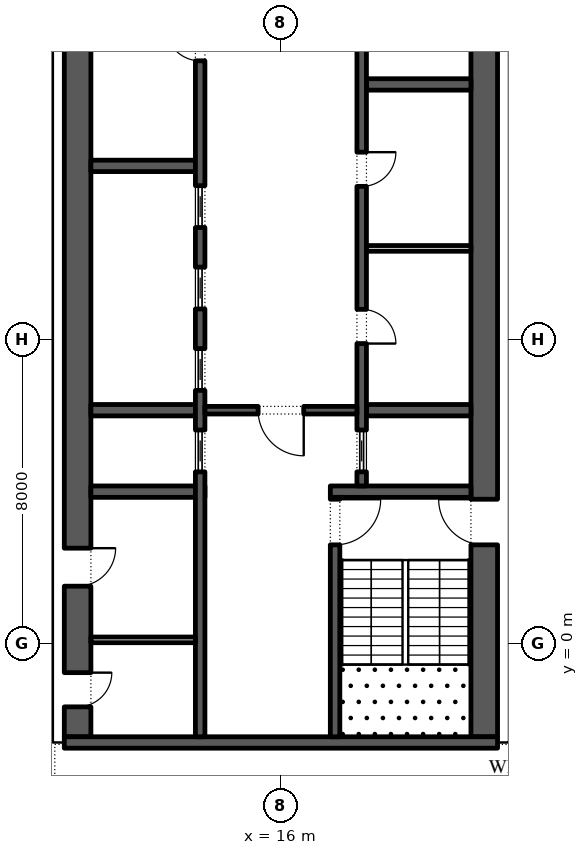
"""IFC4 building model, lengths in metres.
Left out: names, types, materials, properties, quantities, classifications, styles, units other than length and angle.
Written with IfcOpenShell. Run it as: python <this file> out.ifc"""

import sys

from ifc_helpers import new_model, si_unit, direction, frame, frame_2d, origin, place, context, subcontext, project, spatial, rectangle, extrude, element, fill, save


model = new_model("IFC4")
c1 = context("Model", 3, precision=1e-05, world=origin(), true_north=direction((0.0, 1.0)))
c2 = subcontext(c1, "Body", "Model", "MODEL_VIEW")
j1 = project(units=[si_unit("LENGTHUNIT", "METRE"), si_unit("PLANEANGLEUNIT", "RADIAN")], contexts=[c1])
p1 = place(None, origin())
s1 = spatial("IfcSite", under=j1, at=p1, CompositionType="ELEMENT")
p2 = place(p1, origin())
s2 = spatial("IfcBuilding", under=s1, at=p2, CompositionType="ELEMENT")
p3 = place(p2, frame((0.0, 0.0, 171.6)))
s3 = spatial("IfcBuildingStorey", under=s2, at=p3, CompositionType="ELEMENT", Elevation=171.6)
p4 = place(p3, frame((33.157, -5.092, 0.0), z_axis=(0.0, 0.0, 1.0), x_axis=(-0.224950279389, 0.974370243697, 0.0)))
e1 = element("IfcWall", 1, at=p4, inside=s3, PredefinedType="STANDARD", context=c2, shape_type="SweptSolid", body=[
    extrude(rectangle(XDim=49.5, YDim=0.3, at=frame_2d((24.75, 0.0))), origin(), (0.0, 0.0, 1.0), 4.0),
])
p5 = place(p4, frame((2.207, 0.0, 0.0)))
e2 = element("IfcOpeningElement", 2, at=p5, cuts=e1, PredefinedType="OPENING", context=c2, shape_type="SweptSolid", body=[
    extrude(rectangle(XDim=2.4, YDim=3.125, at=frame_2d((1.2, 1.562))), frame((0.0, 0.16, 0.0), z_axis=(0.0, -1.0, 0.0), x_axis=(1.0, 0.0, 0.0)), (0.0, 0.0, 1.0), 0.32),
])
p6 = place(p4, frame((8.121, 0.0, 0.45)))
e3 = element("IfcOpeningElement", 3, at=p6, cuts=e1, PredefinedType="OPENING", context=c2, shape_type="SweptSolid", body=[
    extrude(rectangle(XDim=4.5, YDim=2.875, at=frame_2d((2.25, 1.438))), frame((0.0, 0.16, 0.0), z_axis=(0.0, -1.0, 0.0), x_axis=(1.0, 0.0, 0.0)), (0.0, 0.0, 1.0), 0.32),
])
p7 = place(p4, frame((15.236, 0.0, 0.45)))
e4 = element("IfcOpeningElement", 4, at=p7, cuts=e1, PredefinedType="OPENING", context=c2, shape_type="SweptSolid", body=[
    extrude(rectangle(XDim=4.5, YDim=2.875, at=frame_2d((2.25, 1.438))), frame((0.0, 0.16, 0.0), z_axis=(0.0, -1.0, 0.0), x_axis=(1.0, 0.0, 0.0)), (0.0, 0.0, 1.0), 0.32),
])
p8 = place(p4, frame((22.35, 0.0, 0.45)))
e5 = element("IfcOpeningElement", 5, at=p8, cuts=e1, PredefinedType="OPENING", context=c2, shape_type="SweptSolid", body=[
    extrude(rectangle(XDim=4.5, YDim=3.0, at=frame_2d((2.25, 1.5))), frame((0.0, 0.16, 0.0), z_axis=(0.0, -1.0, 0.0), x_axis=(1.0, 0.0, 0.0)), (0.0, 0.0, 1.0), 0.32),
])
p9 = place(p4, frame((30.514, 0.0, 0.0)))
e6 = element("IfcOpeningElement", 6, at=p9, cuts=e1, PredefinedType="OPENING", context=c2, shape_type="SweptSolid", body=[
    extrude(rectangle(XDim=2.4, YDim=3.45, at=frame_2d((1.2, 1.725))), frame((0.0, 0.16, 0.0), z_axis=(0.0, -1.0, 0.0), x_axis=(1.0, 0.0, 0.0)), (0.0, 0.0, 1.0), 0.32),
])
p10 = place(p4, frame((36.579, 0.0, 0.45)))
e7 = element("IfcOpeningElement", 7, at=p10, cuts=e1, PredefinedType="OPENING", context=c2, shape_type="SweptSolid", body=[
    extrude(rectangle(XDim=4.5, YDim=3.05, at=frame_2d((2.25, 1.525))), frame((0.0, 0.16, 0.0), z_axis=(0.0, -1.0, 0.0), x_axis=(1.0, 0.0, 0.0)), (0.0, 0.0, 1.0), 0.32),
])
p11 = place(p4, frame((43.693, 0.0, 0.45)))
e8 = element("IfcOpeningElement", 8, at=p11, cuts=e1, PredefinedType="OPENING", context=c2, shape_type="SweptSolid", body=[
    extrude(rectangle(XDim=4.5, YDim=3.05, at=frame_2d((2.25, 1.525))), frame((0.0, 0.16, 0.0), z_axis=(0.0, -1.0, 0.0), x_axis=(1.0, 0.0, 0.0)), (0.0, 0.0, 1.0), 0.32),
])
p12 = place(p3, frame((21.35, -2.45, 0.0), z_axis=(0.0, 0.0, 1.0), x_axis=(0.0, 1.0, 0.0)))
e9 = element("IfcWall", 9, at=p12, inside=s3, PredefinedType="SHEAR", context=c2, shape_type="SweptSolid", body=[
    extrude(rectangle(XDim=27.9, YDim=0.7, at=frame_2d((13.95, 0.0))), origin(), (0.0, 0.0, 1.0), 4.0),
])
p13 = place(p12, frame((5.05, 0.0, 0.0)))
e10 = element("IfcOpeningElement", 10, at=p13, cuts=e9, PredefinedType="OPENING", context=c2, shape_type="SweptSolid", body=[
    extrude(rectangle(XDim=1.2, YDim=2.1, at=frame_2d((0.6, 1.05))), frame((0.0, 0.36, 0.0), z_axis=(0.0, -1.0, 0.0), x_axis=(1.0, 0.0, 0.0)), (0.0, 0.0, 1.0), 0.72),
])
p14 = place(p12, frame((21.65, 0.0, 0.0)))
e11 = element("IfcOpeningElement", 11, at=p14, cuts=e9, PredefinedType="OPENING", context=c2, shape_type="SweptSolid", body=[
    extrude(rectangle(XDim=1.2, YDim=2.1, at=frame_2d((0.6, 1.05))), frame((0.0, 0.36, 0.0), z_axis=(0.0, -1.0, 0.0), x_axis=(1.0, 0.0, 0.0)), (0.0, 0.0, 1.0), 0.72),
])
p15 = place(p3, frame((10.65, -2.45, 0.0), z_axis=(0.0, 0.0, 1.0), x_axis=(0.0, 1.0, 0.0)))
e12 = element("IfcWall", 12, at=p15, inside=s3, PredefinedType="SHEAR", context=c2, shape_type="SweptSolid", body=[
    extrude(rectangle(XDim=27.9, YDim=0.7, at=frame_2d((13.95, 0.0))), origin(), (0.0, 0.0, 1.0), 4.0),
])
p16 = place(p15, frame((23.65, 0.0, 0.0)))
e13 = element("IfcOpeningElement", 13, at=p16, cuts=e12, PredefinedType="OPENING", context=c2, shape_type="SweptSolid", body=[
    extrude(rectangle(XDim=2.4, YDim=2.1, at=frame_2d((1.2, 1.05))), frame((0.0, 0.36, 0.0), z_axis=(0.0, -1.0, 0.0), x_axis=(1.0, 0.0, 0.0)), (0.0, 0.0, 1.0), 0.72),
])
p17 = place(p15, frame((0.788, 0.0, 0.0)))
e14 = element("IfcOpeningElement", 14, at=p17, cuts=e12, PredefinedType="OPENING", context=c2, shape_type="SweptSolid", body=[
    extrude(rectangle(XDim=0.9, YDim=2.1, at=frame_2d((0.45, 1.05))), frame((0.0, 0.36, 0.0), z_axis=(0.0, -1.0, 0.0), x_axis=(1.0, 0.0, 0.0)), (0.0, 0.0, 1.0), 0.72),
])
p18 = place(p15, frame((3.962, 0.0, 0.0)))
e15 = element("IfcOpeningElement", 15, at=p18, cuts=e12, PredefinedType="OPENING", context=c2, shape_type="SweptSolid", body=[
    extrude(rectangle(XDim=1.0, YDim=2.1, at=frame_2d((0.5, 1.05))), frame((0.0, 0.36, 0.0), z_axis=(0.0, -1.0, 0.0), x_axis=(1.0, 0.0, 0.0)), (0.0, 0.0, 1.0), 0.72),
])
p19 = place(p3, frame((10.3, -2.6, 0.0), z_axis=(0.0, 0.0, 1.0), x_axis=(1.0, 0.0, 0.0)))
e16 = element("IfcWall", 16, at=p19, inside=s3, PredefinedType="SHEAR", context=c2, shape_type="SweptSolid", body=[
    extrude(rectangle(XDim=11.4, YDim=0.3, at=frame_2d((5.7, 0.0))), origin(), (0.0, 0.0, 1.0), 4.0),
])
p20 = place(p3, frame((17.3, 4.0, 0.0), z_axis=(0.0, 0.0, 1.0), x_axis=(1.0, 0.0, 0.0)))
e17 = element("IfcWall", 17, at=p20, inside=s3, PredefinedType="SHEAR", context=c2, shape_type="SweptSolid", body=[
    extrude(rectangle(XDim=3.7, YDim=0.3, at=frame_2d((1.85, 0.0))), origin(), (0.0, 0.0, 1.0), 4.0),
])
p21 = place(p3, frame((17.425, -2.45, 0.0), z_axis=(0.0, 0.0, 1.0), x_axis=(0.0, 1.0, 0.0)))
e18 = element("IfcWall", 18, at=p21, inside=s3, PredefinedType="SHEAR", context=c2, shape_type="SweptSolid", body=[
    extrude(rectangle(XDim=6.3, YDim=0.25, at=frame_2d((3.15, 0.0))), origin(), (0.0, 0.0, 1.0), 4.0),
])
p22 = place(p21, frame((5.05, 0.0, 0.0)))
e19 = element("IfcOpeningElement", 19, at=p22, cuts=e18, PredefinedType="OPENING", context=c2, shape_type="SweptSolid", body=[
    extrude(rectangle(XDim=1.2, YDim=2.1, at=frame_2d((0.6, 1.05))), frame((0.0, 0.135, 0.0), z_axis=(0.0, -1.0, 0.0), x_axis=(1.0, 0.0, 0.0)), (0.0, 0.0, 1.0), 0.27),
])
for number, where, z_axis, x_axis in (
    (20, (18.25, 6.143, 0.0), (0.0, 0.0, 1.0), (1.0, 0.0, 0.0)),
    (21, (18.25, 14.714, 0.0), (0.0, 0.0, 1.0), (1.0, 0.0, 0.0)),
):
    element("IfcWall", number, at=place(p3, frame(where, z_axis=z_axis, x_axis=x_axis)), inside=s3, PredefinedType="SHEAR", context=c2, shape_type="SweptSolid", body=[
        extrude(rectangle(XDim=2.75, YDim=0.3, at=frame_2d((1.375, 0.0))), origin(), (0.0, 0.0, 1.0), 4.0),
    ])
p23 = place(p3, frame((18.125, 4.15, 0.0), z_axis=(0.0, 0.0, 1.0), x_axis=(0.0, 1.0, 0.0)))
e22 = element("IfcWall", 22, at=p23, inside=s3, PredefinedType="SHEAR", context=c2, shape_type="SweptSolid", body=[
    extrude(rectangle(XDim=14.7, YDim=0.25, at=frame_2d((7.35, 0.0))), origin(), (0.0, 0.0, 1.0), 4.0),
])
p24 = place(p23, frame((3.746, 0.0, 0.0)))
e23 = element("IfcOpeningElement", 23, at=p24, cuts=e22, PredefinedType="OPENING", context=c2, shape_type="SweptSolid", body=[
    extrude(rectangle(XDim=0.9, YDim=2.1, at=frame_2d((0.45, 1.05))), frame((0.0, 0.135, 0.0), z_axis=(0.0, -1.0, 0.0), x_axis=(1.0, 0.0, 0.0)), (0.0, 0.0, 1.0), 0.27),
])
p25 = place(p23, frame((7.882, 0.0, 0.0)))
e24 = element("IfcOpeningElement", 24, at=p25, cuts=e22, PredefinedType="OPENING", context=c2, shape_type="SweptSolid", body=[
    extrude(rectangle(XDim=0.9, YDim=2.1, at=frame_2d((0.45, 1.05))), frame((0.0, 0.135, 0.0), z_axis=(0.0, -1.0, 0.0), x_axis=(1.0, 0.0, 0.0)), (0.0, 0.0, 1.0), 0.27),
])
p26 = place(p23, frame((0.371, 0.0, 0.0)))
e25 = element("IfcOpeningElement", 25, at=p26, cuts=e22, PredefinedType="OPENING", context=c2, shape_type="SweptSolid", body=[
    extrude(rectangle(XDim=1.1, YDim=2.1, at=frame_2d((0.55, 1.05))), frame((0.0, 0.135, 0.0), z_axis=(0.0, -1.0, 0.0), x_axis=(1.0, 0.0, 0.0)), (0.0, 0.0, 1.0), 0.27),
])
p27 = place(p23, frame((13.229, 0.0, 0.0)))
e26 = element("IfcOpeningElement", 26, at=p27, cuts=e22, PredefinedType="OPENING", context=c2, shape_type="SweptSolid", body=[
    extrude(rectangle(XDim=1.1, YDim=2.1, at=frame_2d((0.55, 1.05))), frame((0.0, 0.135, 0.0), z_axis=(0.0, -1.0, 0.0), x_axis=(1.0, 0.0, 0.0)), (0.0, 0.0, 1.0), 0.27),
])
p28 = place(p3, frame((18.25, 10.4, 0.0), z_axis=(0.0, 0.0, 1.0), x_axis=(1.0, 0.0, 0.0)))
e27 = element("IfcWall", 27, at=p28, inside=s3, PredefinedType="PARTITIONING", context=c2, shape_type="SweptSolid", body=[
    extrude(rectangle(XDim=2.75, YDim=0.15, at=frame_2d((1.375, 0.0))), origin(), (0.0, 0.0, 1.0), 4.0),
])
p29 = place(p3, frame((11.0, 4.0, 0.0), z_axis=(0.0, 0.0, 1.0), x_axis=(1.0, 0.0, 0.0)))
e28 = element("IfcWall", 28, at=p29, inside=s3, PredefinedType="SHEAR", context=c2, shape_type="SweptSolid", body=[
    extrude(rectangle(XDim=3.0, YDim=0.3, at=frame_2d((1.5, 0.0))), origin(), (0.0, 0.0, 1.0), 4.0),
])
for number, where, z_axis, x_axis in (
    (29, (11.0, 6.143, 0.0), (0.0, 0.0, 1.0), (1.0, 0.0, 0.0)),
    (30, (11.0, 12.571, 0.0), (0.0, 0.0, 1.0), (1.0, 0.0, 0.0)),
):
    element("IfcWall", number, at=place(p3, frame(where, z_axis=z_axis, x_axis=x_axis)), inside=s3, PredefinedType="SHEAR", context=c2, shape_type="SweptSolid", body=[
        extrude(rectangle(XDim=2.75, YDim=0.3, at=frame_2d((1.375, 0.0))), origin(), (0.0, 0.0, 1.0), 4.0),
    ])
p30 = place(p3, frame((13.875, -2.45, 0.0), z_axis=(0.0, 0.0, 1.0), x_axis=(0.0, 1.0, 0.0)))
e31 = element("IfcWall", 31, at=p30, inside=s3, PredefinedType="SHEAR", context=c2, shape_type="SweptSolid", body=[
    extrude(rectangle(XDim=21.3, YDim=0.25, at=frame_2d((10.65, 0.0))), origin(), (0.0, 0.0, 1.0), 4.0),
])
p31 = place(p30, frame((17.786, 0.0, 0.0)))
e32 = element("IfcOpeningElement", 32, at=p31, cuts=e31, PredefinedType="OPENING", context=c2, shape_type="SweptSolid", body=[
    extrude(rectangle(XDim=0.9, YDim=2.1, at=frame_2d((0.45, 1.05))), frame((0.0, 0.135, 0.0), z_axis=(0.0, -1.0, 0.0), x_axis=(1.0, 0.0, 0.0)), (0.0, 0.0, 1.0), 0.27),
])
p32 = place(p30, frame((6.971, 0.0, 0.0)))
e33 = element("IfcOpeningElement", 33, at=p32, cuts=e31, PredefinedType="OPENING", context=c2, shape_type="SweptSolid", body=[
    extrude(rectangle(XDim=1.1, YDim=2.1, at=frame_2d((0.55, 1.05))), frame((0.0, 0.135, 0.0), z_axis=(0.0, -1.0, 0.0), x_axis=(1.0, 0.0, 0.0)), (0.0, 0.0, 1.0), 0.27),
])
p33 = place(p30, frame((9.114, 0.0, 0.0)))
e34 = element("IfcOpeningElement", 34, at=p33, cuts=e31, PredefinedType="OPENING", context=c2, shape_type="SweptSolid", body=[
    extrude(rectangle(XDim=1.1, YDim=2.1, at=frame_2d((0.55, 1.05))), frame((0.0, 0.135, 0.0), z_axis=(0.0, -1.0, 0.0), x_axis=(1.0, 0.0, 0.0)), (0.0, 0.0, 1.0), 0.27),
])
p34 = place(p30, frame((11.257, 0.0, 0.0)))
e35 = element("IfcOpeningElement", 35, at=p34, cuts=e31, PredefinedType="OPENING", context=c2, shape_type="SweptSolid", body=[
    extrude(rectangle(XDim=1.1, YDim=2.1, at=frame_2d((0.55, 1.05))), frame((0.0, 0.135, 0.0), z_axis=(0.0, -1.0, 0.0), x_axis=(1.0, 0.0, 0.0)), (0.0, 0.0, 1.0), 0.27),
])
p35 = place(p30, frame((13.4, 0.0, 0.0)))
e36 = element("IfcOpeningElement", 36, at=p35, cuts=e31, PredefinedType="OPENING", context=c2, shape_type="SweptSolid", body=[
    extrude(rectangle(XDim=1.1, YDim=2.1, at=frame_2d((0.55, 1.05))), frame((0.0, 0.135, 0.0), z_axis=(0.0, -1.0, 0.0), x_axis=(1.0, 0.0, 0.0)), (0.0, 0.0, 1.0), 0.27),
])
p36 = place(p3, frame((14.0, 6.143, 0.0), z_axis=(0.0, 0.0, 1.0), x_axis=(1.0, 0.0, 0.0)))
e37 = element("IfcWall", 37, at=p36, inside=s3, PredefinedType="SHEAR", context=c2, shape_type="SweptSolid", body=[
    extrude(rectangle(XDim=4.0, YDim=0.2, at=frame_2d((2.0, 0.0))), origin(), (0.0, 0.0, 1.0), 4.0),
])
p37 = place(p36, frame((1.4, 0.0, 0.0)))
e38 = element("IfcOpeningElement", 38, at=p37, cuts=e37, PredefinedType="OPENING", context=c2, shape_type="SweptSolid", body=[
    extrude(rectangle(XDim=1.2, YDim=2.1, at=frame_2d((0.6, 1.05))), frame((0.0, 0.11, 0.0), z_axis=(0.0, -1.0, 0.0), x_axis=(1.0, 0.0, 0.0)), (0.0, 0.0, 1.0), 0.22),
])
p38 = place(p3, frame((11.0, 0.1, 0.0), z_axis=(0.0, 0.0, 1.0), x_axis=(1.0, 0.0, 0.0)))
e39 = element("IfcWall", 39, at=p38, inside=s3, PredefinedType="PARTITIONING", context=c2, shape_type="SweptSolid", body=[
    extrude(rectangle(XDim=2.75, YDim=0.15, at=frame_2d((1.375, 0.0))), origin(), (0.0, 0.0, 1.0), 4.0),
])
p39 = place(p24, frame((0.9, -0.2, 0.0), z_axis=(0.0, 0.0, 1.0), x_axis=(-1.0, 0.0, 0.0)))
e40 = element("IfcDoor", 40, at=p39, inside=s3, OperationType="SINGLE_SWING_LEFT", PredefinedType="DOOR", context=c2, shape_type="SweptSolid", body=[
    extrude(rectangle(XDim=0.9, YDim=2.1, at=frame_2d((0.45, 1.05))), frame((0.0, -0.075, 0.0), z_axis=(0.0, -1.0, 0.0), x_axis=(1.0, 0.0, 0.0)), (0.0, 0.0, 1.0), 0.05),
])
fill(e23, e40)
p40 = place(p25, frame((0.9, -0.2, 0.0), z_axis=(0.0, 0.0, 1.0), x_axis=(-1.0, 0.0, 0.0)))
e41 = element("IfcDoor", 41, at=p40, inside=s3, OperationType="SINGLE_SWING_RIGHT", PredefinedType="DOOR", context=c2, shape_type="SweptSolid", body=[
    extrude(rectangle(XDim=0.9, YDim=2.1, at=frame_2d((0.45, 1.05))), frame((0.0, -0.075, 0.0), z_axis=(0.0, -1.0, 0.0), x_axis=(1.0, 0.0, 0.0)), (0.0, 0.0, 1.0), 0.05),
])
fill(e24, e41)
p41 = place(p26, origin())
e42 = element("IfcDoor", 42, at=p41, inside=s3, OperationType="SLIDING_TO_LEFT", PredefinedType="DOOR", context=c2, shape_type="SweptSolid", body=[
    extrude(rectangle(XDim=1.1, YDim=2.1, at=frame_2d((0.55, 1.05))), frame((0.0, 0.025, 0.0), z_axis=(0.0, -1.0, 0.0), x_axis=(1.0, 0.0, 0.0)), (0.0, 0.0, 1.0), 0.05),
])
fill(e25, e42)
p42 = place(p31, origin())
e43 = element("IfcDoor", 43, at=p42, inside=s3, OperationType="SINGLE_SWING_LEFT", PredefinedType="DOOR", context=c2, shape_type="SweptSolid", body=[
    extrude(rectangle(XDim=0.9, YDim=2.1, at=frame_2d((0.45, 1.05))), frame((0.0, 0.125, 0.0), z_axis=(0.0, -1.0, 0.0), x_axis=(1.0, 0.0, 0.0)), (0.0, 0.0, 1.0), 0.05),
])
fill(e32, e43)
p43 = place(p32, origin())
e44 = element("IfcDoor", 44, at=p43, inside=s3, OperationType="SLIDING_TO_LEFT", PredefinedType="DOOR", context=c2, shape_type="SweptSolid", body=[
    extrude(rectangle(XDim=1.1, YDim=2.1, at=frame_2d((0.55, 1.05))), frame((0.0, 0.025, 0.0), z_axis=(0.0, -1.0, 0.0), x_axis=(1.0, 0.0, 0.0)), (0.0, 0.0, 1.0), 0.05),
])
fill(e33, e44)
p44 = place(p33, origin())
e45 = element("IfcDoor", 45, at=p44, inside=s3, OperationType="SLIDING_TO_LEFT", PredefinedType="DOOR", context=c2, shape_type="SweptSolid", body=[
    extrude(rectangle(XDim=1.1, YDim=2.1, at=frame_2d((0.55, 1.05))), frame((0.0, 0.025, 0.0), z_axis=(0.0, -1.0, 0.0), x_axis=(1.0, 0.0, 0.0)), (0.0, 0.0, 1.0), 0.05),
])
fill(e34, e45)
p45 = place(p34, origin())
e46 = element("IfcDoor", 46, at=p45, inside=s3, OperationType="SLIDING_TO_LEFT", PredefinedType="DOOR", context=c2, shape_type="SweptSolid", body=[
    extrude(rectangle(XDim=1.1, YDim=2.1, at=frame_2d((0.55, 1.05))), frame((0.0, 0.025, 0.0), z_axis=(0.0, -1.0, 0.0), x_axis=(1.0, 0.0, 0.0)), (0.0, 0.0, 1.0), 0.05),
])
fill(e35, e46)
p46 = place(p35, origin())
e47 = element("IfcDoor", 47, at=p46, inside=s3, OperationType="SLIDING_TO_LEFT", PredefinedType="DOOR", context=c2, shape_type="SweptSolid", body=[
    extrude(rectangle(XDim=1.1, YDim=2.1, at=frame_2d((0.55, 1.05))), frame((0.0, 0.025, 0.0), z_axis=(0.0, -1.0, 0.0), x_axis=(1.0, 0.0, 0.0)), (0.0, 0.0, 1.0), 0.05),
])
fill(e36, e47)
p47 = place(p37, frame((1.2, 0.0, 0.0), z_axis=(0.0, 0.0, 1.0), x_axis=(-1.0, 0.0, 0.0)))
e48 = element("IfcDoor", 48, at=p47, inside=s3, OperationType="SINGLE_SWING_RIGHT", PredefinedType="DOOR", context=c2, shape_type="SweptSolid", body=[
    extrude(rectangle(XDim=1.2, YDim=2.1, at=frame_2d((0.6, 1.05))), frame((0.0, 0.025, 0.0), z_axis=(0.0, -1.0, 0.0), x_axis=(1.0, 0.0, 0.0)), (0.0, 0.0, 1.0), 0.05),
])
fill(e38, e48)
p48 = place(p22, frame((1.2, 0.0, 0.0), z_axis=(0.0, 0.0, 1.0), x_axis=(-1.0, 0.0, 0.0)))
e49 = element("IfcDoor", 49, at=p48, inside=s3, OperationType="SINGLE_SWING_RIGHT", PredefinedType="DOOR", context=c2, shape_type="SweptSolid", body=[
    extrude(rectangle(XDim=1.2, YDim=2.1, at=frame_2d((0.6, 1.05))), frame((0.0, 0.025, 0.0), z_axis=(0.0, -1.0, 0.0), x_axis=(1.0, 0.0, 0.0)), (0.0, 0.0, 1.0), 0.05),
])
fill(e19, e49)
p49 = place(p13, origin())
e50 = element("IfcDoor", 50, at=p49, inside=s3, OperationType="SINGLE_SWING_LEFT", PredefinedType="DOOR", context=c2, shape_type="SweptSolid", body=[
    extrude(rectangle(XDim=1.2, YDim=2.1, at=frame_2d((0.6, 1.05))), frame((0.0, 0.025, 0.0), z_axis=(0.0, -1.0, 0.0), x_axis=(1.0, 0.0, 0.0)), (0.0, 0.0, 1.0), 0.05),
])
fill(e10, e50)
p50 = place(p17, frame((0.9, -0.65, 0.0), z_axis=(0.0, 0.0, 1.0), x_axis=(-1.0, 0.0, 0.0)))
e51 = element("IfcDoor", 51, at=p50, inside=s3, OperationType="SINGLE_SWING_RIGHT", PredefinedType="DOOR", context=c2, shape_type="SweptSolid", body=[
    extrude(rectangle(XDim=0.9, YDim=2.1, at=frame_2d((0.45, 1.05))), frame((0.0, -0.3, 0.0), z_axis=(0.0, -1.0, 0.0), x_axis=(1.0, 0.0, 0.0)), (0.0, 0.0, 1.0), 0.05),
])
fill(e14, e51)
p51 = place(p18, frame((1.0, -0.65, 0.0), z_axis=(0.0, 0.0, 1.0), x_axis=(-1.0, 0.0, 0.0)))
e52 = element("IfcDoor", 52, at=p51, inside=s3, OperationType="SINGLE_SWING_RIGHT", PredefinedType="DOOR", context=c2, shape_type="SweptSolid", body=[
    extrude(rectangle(XDim=1.0, YDim=2.1, at=frame_2d((0.5, 1.05))), frame((0.0, -0.3, 0.0), z_axis=(0.0, -1.0, 0.0), x_axis=(1.0, 0.0, 0.0)), (0.0, 0.0, 1.0), 0.05),
])
fill(e15, e52)
save(model, sys.argv[1])
